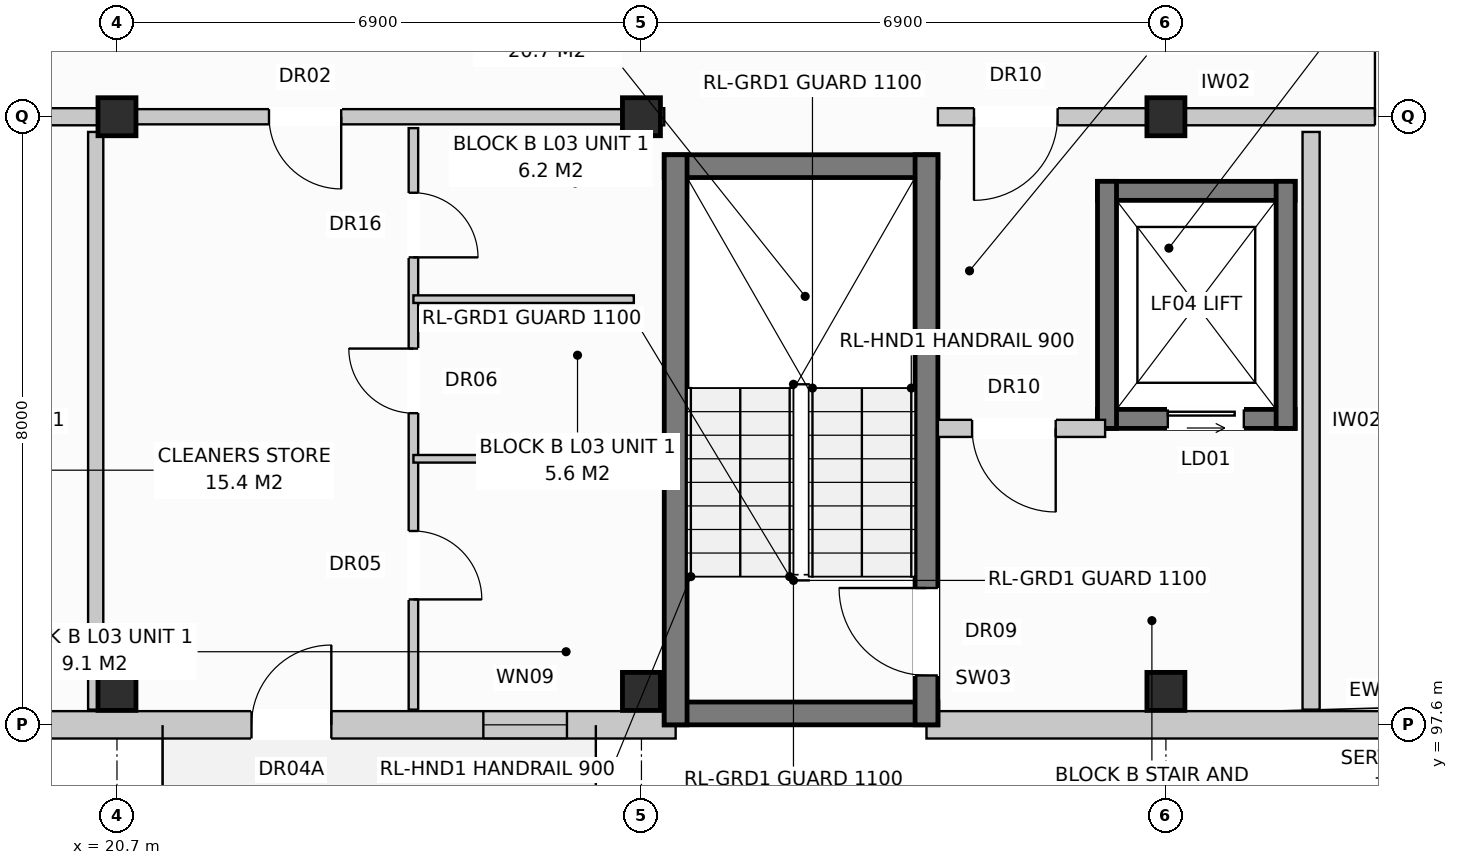
"""IFC4 building model, lengths in metres.
Left out: names, types, materials, properties, quantities, classifications, styles, units other than length and angle.
Written with IfcOpenShell. Run it as: python <this file> out.ifc"""

import sys

from ifc_helpers import new_model, si_unit, direction, frame, frame_2d, origin, origin_with_axes, origin_2d, place, context, subcontext, project, spatial, rectangle, extrude, element, fill, save


model = new_model("IFC4")
c1 = context("Model", 3, precision=1e-05, world=origin(), true_north=direction((0.0, 1.0)))
c2 = subcontext(c1, "Body", "Model", "MODEL_VIEW")
j1 = project(units=[si_unit("LENGTHUNIT", "METRE"), si_unit("PLANEANGLEUNIT", "RADIAN")], contexts=[c1])
p1 = place(None, origin())
s1 = spatial("IfcSite", under=j1, at=p1, CompositionType="ELEMENT")
p2 = place(p1, origin())
s2 = spatial("IfcBuilding", under=s1, at=p2, CompositionType="ELEMENT")
p3 = place(p2, frame((0.0, 0.0, 11.2)))
s3 = spatial("IfcBuildingStorey", under=s2, at=p3, CompositionType="ELEMENT", Elevation=11.2)
for number, where, z_axis, x_axis in (
    (1, (20.7, 98.04, 0.0), (0.0, 0.0, 1.0), (1.0, 0.0, 0.0)),
    (2, (20.7, 105.6, 0.0), (0.0, 0.0, 1.0), (1.0, 0.0, 0.0)),
    (3, (27.6, 98.04, 0.0), (0.0, 0.0, 1.0), (1.0, 0.0, 0.0)),
    (4, (27.6, 105.6, 0.0), (0.0, 0.0, 1.0), (1.0, 0.0, 0.0)),
    (5, (34.5, 98.04, 0.0), (0.0, 0.0, 1.0), (1.0, 0.0, 0.0)),
    (6, (34.5, 105.6, 0.0), (0.0, 0.0, 1.0), (1.0, 0.0, 0.0)),
):
    element("IfcColumn", number, at=place(p3, frame(where, z_axis=z_axis, x_axis=x_axis)), inside=s3, PredefinedType="COLUMN", context=c2, shape_type="SweptSolid", body=[
        extrude(rectangle(XDim=0.5, YDim=0.5, at=origin_2d()), origin(), (0.0, 0.0, 1.0), 3.2),
    ])
p4 = place(p3, frame((10.65, 97.6, 0.0), z_axis=(0.0, 0.0, 1.0), x_axis=(1.0, 0.0, 0.0)))
e7 = element("IfcWall", 7, at=p4, inside=s3, PredefinedType="STANDARD", context=c2, shape_type="SweptSolid", body=[
    extrude(rectangle(XDim=17.4, YDim=0.36, at=frame_2d((8.7, 0.0))), origin(), (0.0, 0.0, 1.0), 2.94),
])
p5 = place(p4, frame((11.82, 0.0, 0.0)))
e8 = element("IfcOpeningElement", 8, at=p5, cuts=e7, PredefinedType="OPENING", context=c2, shape_type="SweptSolid", body=[
    extrude(rectangle(XDim=1.05, YDim=2.12, at=frame_2d((0.525, 1.06))), frame((0.0, 0.192, 0.0), z_axis=(0.0, -1.0, 0.0), x_axis=(1.0, 0.0, 0.0)), (0.0, 0.0, 1.0), 0.384),
])
p6 = place(p4, frame((14.87, 0.0, 0.72)))
e9 = element("IfcOpeningElement", 9, at=p6, cuts=e7, PredefinedType="OPENING", context=c2, shape_type="SweptSolid", body=[
    extrude(rectangle(XDim=1.1, YDim=1.5, at=frame_2d((0.55, 0.75))), frame((0.0, 0.192, 0.0), z_axis=(0.0, -1.0, 0.0), x_axis=(1.0, 0.0, 0.0)), (0.0, 0.0, 1.0), 0.384),
])
p7 = place(p3, frame((31.35, 97.6, 0.0), z_axis=(0.0, 0.0, 1.0), x_axis=(1.0, 0.0, 0.0)))
e10 = element("IfcWall", 10, at=p7, inside=s3, PredefinedType="STANDARD", context=c2, shape_type="SweptSolid", body=[
    extrude(rectangle(XDim=23.68, YDim=0.36, at=frame_2d((11.84, 0.0))), origin(), (0.0, 0.0, 1.0), 2.94),
])
p8 = place(p7, frame((13.977, 0.0, 0.0)))
e11 = element("IfcOpeningElement", 11, at=p8, cuts=e10, PredefinedType="OPENING", context=c2, shape_type="SweptSolid", body=[
    extrude(rectangle(XDim=1.05, YDim=2.12, at=frame_2d((0.525, 1.06))), frame((0.0, 0.192, 0.0), z_axis=(0.0, -1.0, 0.0), x_axis=(1.0, 0.0, 0.0)), (0.0, 0.0, 1.0), 0.384),
])
p9 = place(p7, frame((12.17, 0.0, 0.72)))
e12 = element("IfcOpeningElement", 12, at=p9, cuts=e10, PredefinedType="OPENING", context=c2, shape_type="SweptSolid", body=[
    extrude(rectangle(XDim=1.1, YDim=1.5, at=frame_2d((0.55, 0.75))), frame((0.0, 0.192, 0.0), z_axis=(0.0, -1.0, 0.0), x_axis=(1.0, 0.0, 0.0)), (0.0, 0.0, 1.0), 0.384),
])
p10 = place(p7, frame((17.52, 0.0, 0.8)))
e13 = element("IfcOpeningElement", 13, at=p10, cuts=e10, PredefinedType="OPENING", context=c2, shape_type="SweptSolid", body=[
    extrude(rectangle(XDim=1.8, YDim=1.7, at=frame_2d((0.9, 0.85))), frame((0.0, 0.192, 0.0), z_axis=(0.0, -1.0, 0.0), x_axis=(1.0, 0.0, 0.0)), (0.0, 0.0, 1.0), 0.384),
])
p11 = place(p7, frame((21.07, 0.0, 0.72)))
e14 = element("IfcOpeningElement", 14, at=p11, cuts=e10, PredefinedType="OPENING", context=c2, shape_type="SweptSolid", body=[
    extrude(rectangle(XDim=1.1, YDim=1.5, at=frame_2d((0.55, 0.75))), frame((0.0, 0.192, 0.0), z_axis=(0.0, -1.0, 0.0), x_axis=(1.0, 0.0, 0.0)), (0.0, 0.0, 1.0), 0.384),
])
p12 = place(p3, frame((20.42, 97.8, 0.0), z_axis=(0.0, 0.0, 1.0), x_axis=(0.0, 1.0, 0.0)))
e15 = element("IfcWall", 15, at=p12, inside=s3, PredefinedType="PARTITIONING", context=c2, shape_type="SweptSolid", body=[
    extrude(rectangle(XDim=7.6, YDim=0.2, at=frame_2d((3.8, 0.0))), origin(), (0.0, 0.0, 1.0), 2.94),
])
p13 = place(p3, frame((10.8, 105.6, 0.0), z_axis=(0.0, 0.0, 1.0), x_axis=(1.0, 0.0, 0.0)))
e16 = element("IfcWall", 16, at=p13, inside=s3, PredefinedType="PARTITIONING", context=c2, shape_type="SweptSolid", body=[
    extrude(rectangle(XDim=9.9, YDim=0.225, at=frame_2d((4.95, 0.0))), origin(), (0.0, 0.0, 1.0), 2.38),
])
p14 = place(p13, frame((0.475, 0.0, 0.0)))
e17 = element("IfcOpeningElement", 17, at=p14, cuts=e16, PredefinedType="OPENING", context=c2, shape_type="SweptSolid", body=[
    extrude(rectangle(XDim=1.1, YDim=2.15, at=frame_2d((0.55, 1.075))), frame((0.0, 0.125, 0.0), z_axis=(0.0, -1.0, 0.0), x_axis=(1.0, 0.0, 0.0)), (0.0, 0.0, 1.0), 0.249),
])
p15 = place(p13, frame((5.75, 0.0, 0.0)))
e18 = element("IfcOpeningElement", 18, at=p15, cuts=e16, PredefinedType="OPENING", context=c2, shape_type="SweptSolid", body=[
    extrude(rectangle(XDim=0.9, YDim=2.1, at=frame_2d((0.45, 1.05))), frame((0.0, 0.125, 0.0), z_axis=(0.0, -1.0, 0.0), x_axis=(1.0, 0.0, 0.0)), (0.0, 0.0, 1.0), 0.249),
])
p16 = place(p13, frame((7.8, 0.0, 0.0)))
e19 = element("IfcOpeningElement", 19, at=p16, cuts=e16, PredefinedType="OPENING", context=c2, shape_type="SweptSolid", body=[
    extrude(rectangle(XDim=0.95, YDim=2.15, at=frame_2d((0.475, 1.075))), frame((0.0, 0.125, 0.0), z_axis=(0.0, -1.0, 0.0), x_axis=(1.0, 0.0, 0.0)), (0.0, 0.0, 1.0), 0.249),
])
for number, where, z_axis, x_axis in (
    (20, (27.9, 97.75, 0.0), (0.0, 0.0, 1.0), (1.0, 0.0, 0.0)),
    (21, (27.9, 104.95, 0.0), (0.0, 0.0, 1.0), (1.0, 0.0, 0.0)),
):
    element("IfcWall", number, at=place(p3, frame(where, z_axis=z_axis, x_axis=x_axis)), inside=s3, PredefinedType="SHEAR", context=c2, shape_type="SweptSolid", body=[
        extrude(rectangle(XDim=3.6, YDim=0.3, at=frame_2d((1.8, 0.0))), origin(), (0.0, 0.0, 1.0), 2.94),
    ])
p17 = place(p3, frame((28.05, 97.6, 0.0), z_axis=(0.0, 0.0, 1.0), x_axis=(0.0, 1.0, 0.0)))
e22 = element("IfcWall", 22, at=p17, inside=s3, PredefinedType="SHEAR", context=c2, shape_type="SweptSolid", body=[
    extrude(rectangle(XDim=7.5, YDim=0.3, at=frame_2d((3.75, 0.0))), origin(), (0.0, 0.0, 1.0), 2.94),
])
p18 = place(p3, frame((31.35, 97.6, 0.0), z_axis=(0.0, 0.0, 1.0), x_axis=(0.0, 1.0, 0.0)))
e23 = element("IfcWall", 23, at=p18, inside=s3, PredefinedType="SHEAR", context=c2, shape_type="SweptSolid", body=[
    extrude(rectangle(XDim=7.5, YDim=0.3, at=frame_2d((3.75, 0.0))), origin(), (0.0, 0.0, 1.0), 2.94),
])
p19 = place(p18, frame((0.65, 0.0, 0.0)))
e24 = element("IfcOpeningElement", 24, at=p19, cuts=e23, PredefinedType="OPENING", context=c2, shape_type="SweptSolid", body=[
    extrude(rectangle(XDim=1.15, YDim=2.15, at=frame_2d((0.575, 1.075))), frame((0.0, 0.162, 0.0), z_axis=(0.0, -1.0, 0.0), x_axis=(1.0, 0.0, 0.0)), (0.0, 0.0, 1.0), 0.324),
])
p20 = place(p3, frame((33.6, 101.625, 0.0), z_axis=(0.0, 0.0, 1.0), x_axis=(1.0, 0.0, 0.0)))
e25 = element("IfcWall", 25, at=p20, inside=s3, PredefinedType="SHEAR", context=c2, shape_type="SweptSolid", body=[
    extrude(rectangle(XDim=2.6, YDim=0.25, at=frame_2d((1.3, 0.0))), origin(), (0.0, 0.0, 1.0), 2.94),
])
p21 = place(p20, frame((0.925, 0.0, 0.0)))
e26 = element("IfcOpeningElement", 26, at=p21, cuts=e25, PredefinedType="OPENING", context=c2, shape_type="SweptSolid", body=[
    extrude(rectangle(XDim=1.0, YDim=2.1, at=frame_2d((0.5, 1.05))), frame((0.0, 0.137, 0.0), z_axis=(0.0, -1.0, 0.0), x_axis=(1.0, 0.0, 0.0)), (0.0, 0.0, 1.0), 0.274),
])
p22 = place(p3, frame((33.6, 104.625, 0.0), z_axis=(0.0, 0.0, 1.0), x_axis=(1.0, 0.0, 0.0)))
e27 = element("IfcWall", 27, at=p22, inside=s3, PredefinedType="SHEAR", context=c2, shape_type="SweptSolid", body=[
    extrude(rectangle(XDim=2.6, YDim=0.25, at=frame_2d((1.3, 0.0))), origin(), (0.0, 0.0, 1.0), 2.94),
])
for number, where, z_axis, x_axis in (
    (28, (33.725, 101.5, 0.0), (0.0, 0.0, 1.0), (0.0, 1.0, 0.0)),
    (29, (36.075, 101.5, 0.0), (0.0, 0.0, 1.0), (0.0, 1.0, 0.0)),
):
    element("IfcWall", number, at=place(p3, frame(where, z_axis=z_axis, x_axis=x_axis)), inside=s3, PredefinedType="SHEAR", context=c2, shape_type="SweptSolid", body=[
        extrude(rectangle(XDim=3.25, YDim=0.25, at=frame_2d((1.625, 0.0))), origin(), (0.0, 0.0, 1.0), 2.94),
    ])
p23 = place(p3, frame((36.41, 97.8, 0.0), z_axis=(0.0, 0.0, 1.0), x_axis=(0.0, 1.0, 0.0)))
e30 = element("IfcWall", 30, at=p23, inside=s3, PredefinedType="PARTITIONING", context=c2, shape_type="SweptSolid", body=[
    extrude(rectangle(XDim=7.6, YDim=0.225, at=frame_2d((3.8, 0.0))), origin(), (0.0, 0.0, 1.0), 2.59),
])
p24 = place(p3, frame((31.5, 101.5, 0.0), z_axis=(0.0, 0.0, 1.0), x_axis=(1.0, 0.0, 0.0)))
e31 = element("IfcWall", 31, at=p24, inside=s3, PredefinedType="PARTITIONING", context=c2, shape_type="SweptSolid", body=[
    extrude(rectangle(XDim=2.2, YDim=0.225, at=frame_2d((1.1, 0.0))), origin(), (0.0, 0.0, 1.0), 2.94),
])
p25 = place(p24, frame((0.45, 0.0, 0.0)))
e32 = element("IfcOpeningElement", 32, at=p25, cuts=e31, PredefinedType="OPENING", context=c2, shape_type="SweptSolid", body=[
    extrude(rectangle(XDim=1.1, YDim=2.15, at=frame_2d((0.55, 1.075))), frame((0.0, 0.125, 0.0), z_axis=(0.0, -1.0, 0.0), x_axis=(1.0, 0.0, 0.0)), (0.0, 0.0, 1.0), 0.249),
])
p26 = place(p3, frame((27.6, 105.6, 0.0), z_axis=(0.0, 0.0, 1.0), x_axis=(1.0, 0.0, 0.0)))
e33 = element("IfcWall", 33, at=p26, inside=s3, PredefinedType="PARTITIONING", context=c2, shape_type="SweptSolid", body=[
    extrude(rectangle(XDim=0.3, YDim=0.225, at=frame_2d((0.15, 0.0))), origin(), (0.0, 0.0, 1.0), 2.94),
])
p27 = place(p3, frame((31.5, 105.6, 0.0), z_axis=(0.0, 0.0, 1.0), x_axis=(1.0, 0.0, 0.0)))
e34 = element("IfcWall", 34, at=p27, inside=s3, PredefinedType="PARTITIONING", context=c2, shape_type="SweptSolid", body=[
    extrude(rectangle(XDim=9.9, YDim=0.225, at=frame_2d((4.95, 0.0))), origin(), (0.0, 0.0, 1.0), 2.38),
])
p28 = place(p27, frame((0.475, 0.0, 0.0)))
e35 = element("IfcOpeningElement", 35, at=p28, cuts=e34, PredefinedType="OPENING", context=c2, shape_type="SweptSolid", body=[
    extrude(rectangle(XDim=1.1, YDim=2.15, at=frame_2d((0.55, 1.075))), frame((0.0, 0.125, 0.0), z_axis=(0.0, -1.0, 0.0), x_axis=(1.0, 0.0, 0.0)), (0.0, 0.0, 1.0), 0.249),
])
p29 = place(p27, frame((5.75, 0.0, 0.0)))
e36 = element("IfcOpeningElement", 36, at=p29, cuts=e34, PredefinedType="OPENING", context=c2, shape_type="SweptSolid", body=[
    extrude(rectangle(XDim=0.9, YDim=2.1, at=frame_2d((0.45, 1.05))), frame((0.0, 0.125, 0.0), z_axis=(0.0, -1.0, 0.0), x_axis=(1.0, 0.0, 0.0)), (0.0, 0.0, 1.0), 0.249),
])
p30 = place(p27, frame((7.8, 0.0, 0.0)))
e37 = element("IfcOpeningElement", 37, at=p30, cuts=e34, PredefinedType="OPENING", context=c2, shape_type="SweptSolid", body=[
    extrude(rectangle(XDim=0.95, YDim=2.15, at=frame_2d((0.475, 1.075))), frame((0.0, 0.125, 0.0), z_axis=(0.0, -1.0, 0.0), x_axis=(1.0, 0.0, 0.0)), (0.0, 0.0, 1.0), 0.249),
])
p31 = place(p3, frame((20.7, 105.6, 0.0), z_axis=(0.0, 0.0, 1.0), x_axis=(1.0, 0.0, 0.0)))
e38 = element("IfcWall", 38, at=p31, inside=s3, PredefinedType="PARTITIONING", context=c2, shape_type="SweptSolid", body=[
    extrude(rectangle(XDim=6.9, YDim=0.2, at=frame_2d((3.45, 0.0))), origin(), (0.0, 0.0, 1.0), 2.38),
])
p32 = place(p31, frame((2.0, 0.0, 0.0)))
e39 = element("IfcOpeningElement", 39, at=p32, cuts=e38, PredefinedType="OPENING", context=c2, shape_type="SweptSolid", body=[
    extrude(rectangle(XDim=0.95, YDim=2.15, at=frame_2d((0.475, 1.075))), frame((0.0, 0.112, 0.0), z_axis=(0.0, -1.0, 0.0), x_axis=(1.0, 0.0, 0.0)), (0.0, 0.0, 1.0), 0.224),
])
p33 = place(p3, frame((24.6, 105.45, 0.0), z_axis=(0.0, 0.0, 1.0), x_axis=(0.0, -1.0, 0.0)))
e40 = element("IfcWall", 40, at=p33, inside=s3, PredefinedType="PARTITIONING", context=c2, shape_type="SweptSolid", body=[
    extrude(rectangle(XDim=7.65, YDim=0.125, at=frame_2d((3.825, 0.0))), origin(), (0.0, 0.0, 1.0), 2.94),
])
p34 = place(p33, frame((0.85, 0.0, 0.0)))
e41 = element("IfcOpeningElement", 41, at=p34, cuts=e40, PredefinedType="OPENING", context=c2, shape_type="SweptSolid", body=[
    extrude(rectangle(XDim=0.85, YDim=2.1, at=frame_2d((0.425, 1.05))), frame((0.0, 0.074, 0.0), z_axis=(0.0, -1.0, 0.0), x_axis=(1.0, 0.0, 0.0)), (0.0, 0.0, 1.0), 0.149),
])
p35 = place(p33, frame((2.9, 0.0, 0.0)))
e42 = element("IfcOpeningElement", 42, at=p35, cuts=e40, PredefinedType="OPENING", context=c2, shape_type="SweptSolid", body=[
    extrude(rectangle(XDim=0.85, YDim=2.05, at=frame_2d((0.425, 1.025))), frame((0.0, 0.074, 0.0), z_axis=(0.0, -1.0, 0.0), x_axis=(1.0, 0.0, 0.0)), (0.0, 0.0, 1.0), 0.149),
])
p36 = place(p33, frame((5.3, 0.0, 0.0)))
e43 = element("IfcOpeningElement", 43, at=p36, cuts=e40, PredefinedType="OPENING", context=c2, shape_type="SweptSolid", body=[
    extrude(rectangle(XDim=0.9, YDim=2.1, at=frame_2d((0.45, 1.05))), frame((0.0, 0.074, 0.0), z_axis=(0.0, -1.0, 0.0), x_axis=(1.0, 0.0, 0.0)), (0.0, 0.0, 1.0), 0.149),
])
for number, where, z_axis, x_axis in (
    (44, (24.6, 103.2, 0.0), (0.0, 0.0, 1.0), (1.0, 0.0, 0.0)),
    (45, (24.6, 101.1, 0.0), (0.0, 0.0, 1.0), (1.0, 0.0, 0.0)),
):
    element("IfcWall", number, at=place(p3, frame(where, z_axis=z_axis, x_axis=x_axis)), inside=s3, PredefinedType="PARTITIONING", context=c2, shape_type="SweptSolid", body=[
        extrude(rectangle(XDim=2.9, YDim=0.1, at=frame_2d((1.45, 0.0))), origin(), (0.0, 0.0, 1.0), 2.94),
    ])
p37 = place(p5, origin_with_axes())
e46 = element("IfcDoor", 46, at=p37, inside=s3, OperationType="SINGLE_SWING_RIGHT", PredefinedType="DOOR", context=c2, shape_type="SweptSolid", body=[
    extrude(rectangle(XDim=1.05, YDim=2.12, at=frame_2d((0.525, 1.06))), frame((0.0, 0.025, 0.0), z_axis=(0.0, -1.0, 0.0), x_axis=(1.0, 0.0, 0.0)), (0.0, 0.0, 1.0), 0.05),
])
fill(e8, e46)
p38 = place(p6, origin_with_axes())
e47 = element("IfcWindow", 47, at=p38, inside=s3, PartitioningType="SINGLE_PANEL", PredefinedType="WINDOW", context=c2, shape_type="SweptSolid", body=[
    extrude(rectangle(XDim=1.1, YDim=1.5, at=frame_2d((0.55, 0.75))), frame((0.0, 0.03, 0.0), z_axis=(0.0, -1.0, 0.0), x_axis=(1.0, 0.0, 0.0)), (0.0, 0.0, 1.0), 0.06),
])
fill(e9, e47)
p39 = place(p19, origin_with_axes())
e48 = element("IfcDoor", 48, at=p39, inside=s3, OperationType="SINGLE_SWING_RIGHT", PredefinedType="DOOR", context=c2, shape_type="SweptSolid", body=[
    extrude(rectangle(XDim=1.15, YDim=2.15, at=frame_2d((0.575, 1.075))), frame((0.0, 0.025, 0.0), z_axis=(0.0, -1.0, 0.0), x_axis=(1.0, 0.0, 0.0)), (0.0, 0.0, 1.0), 0.05),
])
fill(e24, e48)
p40 = place(p21, origin_with_axes())
e49 = element("IfcDoor", 49, at=p40, inside=s3, OperationType="SLIDING_TO_LEFT", PredefinedType="DOOR", context=c2, shape_type="SweptSolid", body=[
    extrude(rectangle(XDim=1.0, YDim=2.1, at=frame_2d((0.5, 1.05))), frame((0.0, 0.025, 0.0), z_axis=(0.0, -1.0, 0.0), x_axis=(1.0, 0.0, 0.0)), (0.0, 0.0, 1.0), 0.05),
])
fill(e26, e49)
p41 = place(p25, frame((1.1, 0.0, 0.0), z_axis=(0.0, 0.0, 1.0), x_axis=(-1.0, 0.0, 0.0)))
e50 = element("IfcDoor", 50, at=p41, inside=s3, OperationType="SINGLE_SWING_RIGHT", PredefinedType="DOOR", context=c2, shape_type="SweptSolid", body=[
    extrude(rectangle(XDim=1.1, YDim=2.15, at=frame_2d((0.55, 1.075))), frame((0.0, 0.025, 0.0), z_axis=(0.0, -1.0, 0.0), x_axis=(1.0, 0.0, 0.0)), (0.0, 0.0, 1.0), 0.05),
])
fill(e32, e50)
p42 = place(p28, frame((1.1, 0.0, 0.0), z_axis=(0.0, 0.0, 1.0), x_axis=(-1.0, 0.0, 0.0)))
e51 = element("IfcDoor", 51, at=p42, inside=s3, OperationType="SINGLE_SWING_LEFT", PredefinedType="DOOR", context=c2, shape_type="SweptSolid", body=[
    extrude(rectangle(XDim=1.1, YDim=2.15, at=frame_2d((0.55, 1.075))), frame((0.0, 0.025, 0.0), z_axis=(0.0, -1.0, 0.0), x_axis=(1.0, 0.0, 0.0)), (0.0, 0.0, 1.0), 0.05),
])
fill(e35, e51)
p43 = place(p29, origin_with_axes())
e52 = element("IfcDoor", 52, at=p43, inside=s3, OperationType="SINGLE_SWING_LEFT", PredefinedType="DOOR", context=c2, shape_type="SweptSolid", body=[
    extrude(rectangle(XDim=0.9, YDim=2.1, at=frame_2d((0.45, 1.05))), frame((0.0, 0.025, 0.0), z_axis=(0.0, -1.0, 0.0), x_axis=(1.0, 0.0, 0.0)), (0.0, 0.0, 1.0), 0.05),
])
fill(e36, e52)
p44 = place(p32, frame((0.95, 0.0, 0.0), z_axis=(0.0, 0.0, 1.0), x_axis=(-1.0, 0.0, 0.0)))
e53 = element("IfcDoor", 53, at=p44, inside=s3, OperationType="SINGLE_SWING_RIGHT", PredefinedType="DOOR", context=c2, shape_type="SweptSolid", body=[
    extrude(rectangle(XDim=0.95, YDim=2.15, at=frame_2d((0.475, 1.075))), frame((0.0, 0.025, 0.0), z_axis=(0.0, -1.0, 0.0), x_axis=(1.0, 0.0, 0.0)), (0.0, 0.0, 1.0), 0.05),
])
fill(e39, e53)
p45 = place(p34, origin_with_axes())
e54 = element("IfcDoor", 54, at=p45, inside=s3, OperationType="SINGLE_SWING_RIGHT", PredefinedType="DOOR", context=c2, shape_type="SweptSolid", body=[
    extrude(rectangle(XDim=0.85, YDim=2.1, at=frame_2d((0.425, 1.05))), frame((0.0, 0.025, 0.0), z_axis=(0.0, -1.0, 0.0), x_axis=(1.0, 0.0, 0.0)), (0.0, 0.0, 1.0), 0.05),
])
fill(e41, e54)
p46 = place(p35, frame((0.85, 0.0, 0.0), z_axis=(0.0, 0.0, 1.0), x_axis=(-1.0, 0.0, 0.0)))
e55 = element("IfcDoor", 55, at=p46, inside=s3, OperationType="SINGLE_SWING_LEFT", PredefinedType="DOOR", context=c2, shape_type="SweptSolid", body=[
    extrude(rectangle(XDim=0.85, YDim=2.05, at=frame_2d((0.425, 1.025))), frame((0.0, 0.025, 0.0), z_axis=(0.0, -1.0, 0.0), x_axis=(1.0, 0.0, 0.0)), (0.0, 0.0, 1.0), 0.05),
])
fill(e42, e55)
p47 = place(p36, origin_with_axes())
e56 = element("IfcDoor", 56, at=p47, inside=s3, OperationType="SINGLE_SWING_RIGHT", PredefinedType="DOOR", context=c2, shape_type="SweptSolid", body=[
    extrude(rectangle(XDim=0.9, YDim=2.1, at=frame_2d((0.45, 1.05))), frame((0.0, 0.025, 0.0), z_axis=(0.0, -1.0, 0.0), x_axis=(1.0, 0.0, 0.0)), (0.0, 0.0, 1.0), 0.05),
])
fill(e43, e56)
save(model, sys.argv[1])
